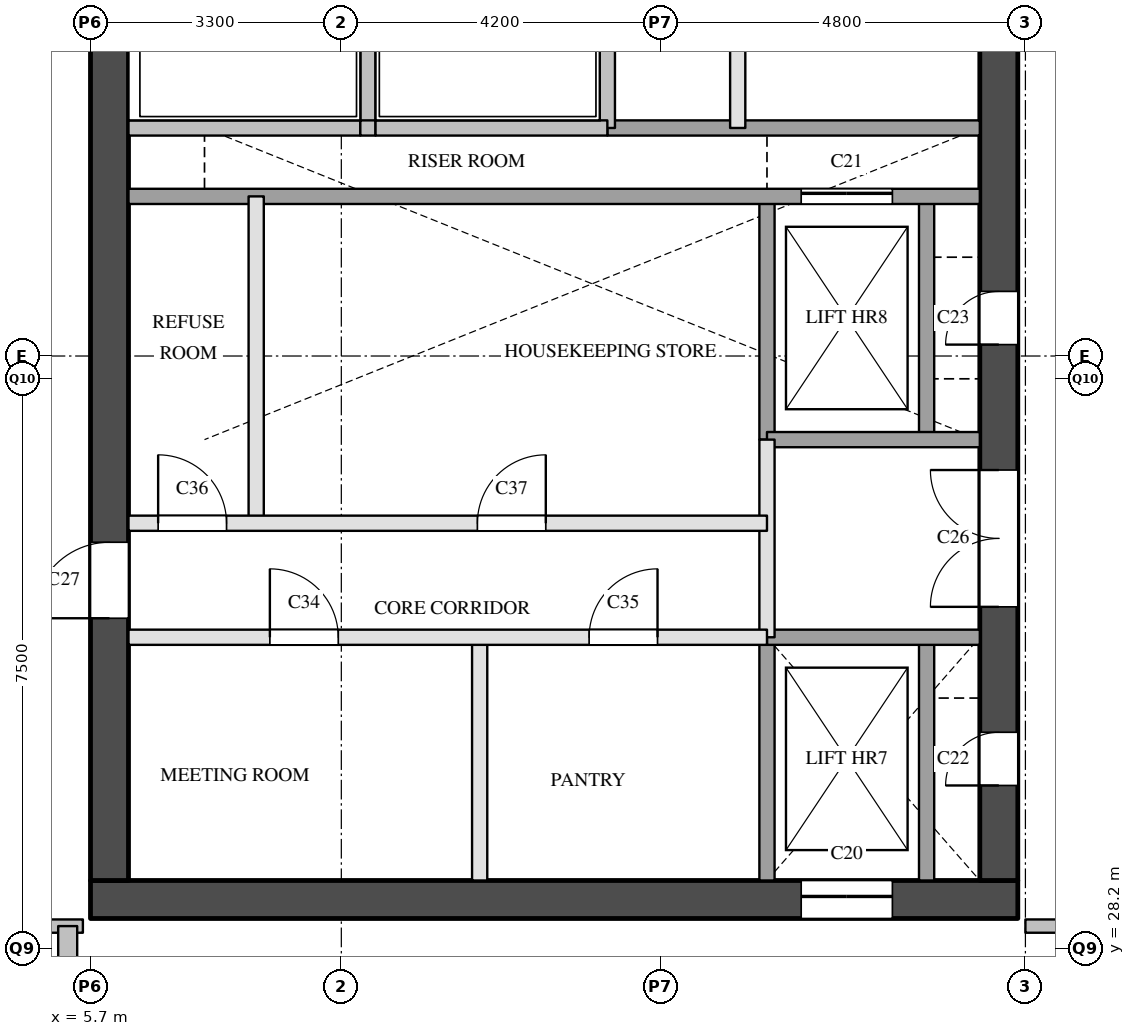
"""IFC4 building model, lengths in metres.
Left out: names, types, materials, properties, quantities, classifications, styles, units other than length and angle.
Written with IfcOpenShell. Run it as: python <this file> out.ifc"""

import sys

from ifc_helpers import new_model, si_unit, direction, frame, frame_2d, origin, place, context, subcontext, project, spatial, rectangle, extrude, element, fill, save


model = new_model("IFC4")
c1 = context("Model", 3, precision=1e-05, world=origin(), true_north=direction((0.0, 1.0)))
c2 = subcontext(c1, "Body", "Model", "MODEL_VIEW")
j1 = project(units=[si_unit("LENGTHUNIT", "METRE"), si_unit("PLANEANGLEUNIT", "RADIAN")], contexts=[c1])
p1 = place(None, origin())
s1 = spatial("IfcSite", under=j1, at=p1, CompositionType="ELEMENT")
p2 = place(p1, origin())
s2 = spatial("IfcBuilding", under=s1, at=p2, CompositionType="ELEMENT")
p3 = place(p2, frame((0.0, 0.0, 189.5)))
s3 = spatial("IfcBuildingStorey", under=s2, at=p3, CompositionType="ELEMENT", Elevation=189.5)
p4 = place(p3, frame((5.7, 28.85, 0.0), z_axis=(0.0, 0.0, 1.0), x_axis=(1.0, 0.0, 0.0)))
e1 = element("IfcWall", 1, at=p4, inside=s3, PredefinedType="SHEAR", context=c2, shape_type="SweptSolid", body=[
    extrude(rectangle(XDim=12.2, YDim=0.5, at=frame_2d((6.1, 0.0))), origin(), (0.0, 0.0, 1.0), 3.6),
])
p5 = place(p4, frame((9.35, 0.0, 0.0)))
e2 = element("IfcOpeningElement", 2, at=p5, cuts=e1, PredefinedType="OPENING", context=c2, shape_type="SweptSolid", body=[
    extrude(rectangle(XDim=1.2, YDim=2.1, at=frame_2d((0.6, 1.05))), frame((0.0, 0.26, 0.0), z_axis=(0.0, -1.0, 0.0), x_axis=(1.0, 0.0, 0.0)), (0.0, 0.0, 1.0), 0.52),
])
p6 = place(p3, frame((5.95, 29.1, 0.0), z_axis=(0.0, 0.0, 1.0), x_axis=(0.0, 1.0, 0.0)))
e3 = element("IfcWall", 3, at=p6, inside=s3, PredefinedType="SHEAR", context=c2, shape_type="SweptSolid", body=[
    extrude(rectangle(XDim=20.3, YDim=0.5, at=frame_2d((10.15, 0.0))), origin(), (0.0, 0.0, 1.0), 3.6),
])
p7 = place(p6, frame((3.45, 0.0, 0.0)))
e4 = element("IfcOpeningElement", 4, at=p7, cuts=e3, PredefinedType="OPENING", context=c2, shape_type="SweptSolid", body=[
    extrude(rectangle(XDim=1.0, YDim=2.1, at=frame_2d((0.5, 1.05))), frame((0.0, 0.26, 0.0), z_axis=(0.0, -1.0, 0.0), x_axis=(1.0, 0.0, 0.0)), (0.0, 0.0, 1.0), 0.52),
])
p8 = place(p6, frame((16.4, 0.0, 0.0)))
e5 = element("IfcOpeningElement", 5, at=p8, cuts=e3, PredefinedType="OPENING", context=c2, shape_type="SweptSolid", body=[
    extrude(rectangle(XDim=1.0, YDim=2.1, at=frame_2d((0.5, 1.05))), frame((0.0, 0.26, 0.0), z_axis=(0.0, -1.0, 0.0), x_axis=(1.0, 0.0, 0.0)), (0.0, 0.0, 1.0), 0.52),
])
p9 = place(p3, frame((17.65, 29.1, 0.0), z_axis=(0.0, 0.0, 1.0), x_axis=(0.0, 1.0, 0.0)))
e6 = element("IfcWall", 6, at=p9, inside=s3, PredefinedType="SHEAR", context=c2, shape_type="SweptSolid", body=[
    extrude(rectangle(XDim=20.3, YDim=0.5, at=frame_2d((10.15, 0.0))), origin(), (0.0, 0.0, 1.0), 3.6),
])
p10 = place(p9, frame((1.25, 0.0, 0.0)))
e7 = element("IfcOpeningElement", 7, at=p10, cuts=e6, PredefinedType="OPENING", context=c2, shape_type="SweptSolid", body=[
    extrude(rectangle(XDim=0.7, YDim=2.1, at=frame_2d((0.35, 1.05))), frame((0.0, 0.26, 0.0), z_axis=(0.0, -1.0, 0.0), x_axis=(1.0, 0.0, 0.0)), (0.0, 0.0, 1.0), 0.52),
])
p11 = place(p9, frame((7.05, 0.0, 0.0)))
e8 = element("IfcOpeningElement", 8, at=p11, cuts=e6, PredefinedType="OPENING", context=c2, shape_type="SweptSolid", body=[
    extrude(rectangle(XDim=0.7, YDim=2.1, at=frame_2d((0.35, 1.05))), frame((0.0, 0.26, 0.0), z_axis=(0.0, -1.0, 0.0), x_axis=(1.0, 0.0, 0.0)), (0.0, 0.0, 1.0), 0.52),
])
p12 = place(p9, frame((3.6, 0.0, 0.0)))
e9 = element("IfcOpeningElement", 9, at=p12, cuts=e6, PredefinedType="OPENING", context=c2, shape_type="SweptSolid", body=[
    extrude(rectangle(XDim=1.8, YDim=2.1, at=frame_2d((0.9, 1.05))), frame((0.0, 0.26, 0.0), z_axis=(0.0, -1.0, 0.0), x_axis=(1.0, 0.0, 0.0)), (0.0, 0.0, 1.0), 0.52),
])
p13 = place(p3, frame((7.88, 33.8, 0.0), z_axis=(0.0, 0.0, 1.0), x_axis=(0.0, 1.0, 0.0)))
e10 = element("IfcWall", 10, at=p13, inside=s3, PredefinedType="PARTITIONING", context=c2, shape_type="SweptSolid", body=[
    extrude(rectangle(XDim=4.3, YDim=0.2, at=frame_2d((2.15, 0.0))), origin(), (0.0, 0.0, 1.0), 3.6),
])
p14 = place(p3, frame((9.35, 39.0, 0.0), z_axis=(0.0, 0.0, 1.0), x_axis=(0.0, 1.0, 0.0)))
e11 = element("IfcWall", 11, at=p14, inside=s3, PredefinedType="SOLIDWALL", context=c2, shape_type="SweptSolid", body=[
    extrude(rectangle(XDim=1.9, YDim=0.2, at=frame_2d((0.95, 0.0))), origin(), (0.0, 0.0, 1.0), 3.6),
])
p15 = place(p3, frame((10.82, 29.1, 0.0), z_axis=(0.0, 0.0, 1.0), x_axis=(0.0, 1.0, 0.0)))
e12 = element("IfcWall", 12, at=p15, inside=s3, PredefinedType="PARTITIONING", context=c2, shape_type="SweptSolid", body=[
    extrude(rectangle(XDim=3.2, YDim=0.2, at=frame_2d((1.6, 0.0))), origin(), (0.0, 0.0, 1.0), 3.6),
])
p16 = place(p3, frame((12.5, 39.0, 0.0), z_axis=(0.0, 0.0, 1.0), x_axis=(0.0, 1.0, 0.0)))
e13 = element("IfcWall", 13, at=p16, inside=s3, PredefinedType="SOLIDWALL", context=c2, shape_type="SweptSolid", body=[
    extrude(rectangle(XDim=1.9, YDim=0.2, at=frame_2d((0.95, 0.0))), origin(), (0.0, 0.0, 1.0), 3.6),
])
p17 = place(p3, frame((14.215, 39.0, 0.0), z_axis=(0.0, 0.0, 1.0), x_axis=(0.0, 1.0, 0.0)))
e14 = element("IfcWall", 14, at=p17, inside=s3, PredefinedType="PARTITIONING", context=c2, shape_type="SweptSolid", body=[
    extrude(rectangle(XDim=6.2, YDim=0.2, at=frame_2d((3.1, 0.0))), origin(), (0.0, 0.0, 1.0), 3.6),
])
p18 = place(p3, frame((14.6, 32.3, 0.0), z_axis=(0.0, 0.0, 1.0), x_axis=(0.0, 1.0, 0.0)))
e15 = element("IfcWall", 15, at=p18, inside=s3, PredefinedType="PARTITIONING", context=c2, shape_type="SweptSolid", body=[
    extrude(rectangle(XDim=2.6, YDim=0.2, at=frame_2d((1.3, 0.0))), origin(), (0.0, 0.0, 1.0), 3.6),
])
p19 = place(p3, frame((14.6, 29.1, 0.0), z_axis=(0.0, 0.0, 1.0), x_axis=(0.0, 1.0, 0.0)))
e16 = element("IfcWall", 16, at=p19, inside=s3, PredefinedType="SOLIDWALL", context=c2, shape_type="SweptSolid", body=[
    extrude(rectangle(XDim=3.2, YDim=0.2, at=frame_2d((1.6, 0.0))), origin(), (0.0, 0.0, 1.0), 3.6),
])
p20 = place(p3, frame((14.6, 34.9, 0.0), z_axis=(0.0, 0.0, 1.0), x_axis=(0.0, 1.0, 0.0)))
e17 = element("IfcWall", 17, at=p20, inside=s3, PredefinedType="SOLIDWALL", context=c2, shape_type="SweptSolid", body=[
    extrude(rectangle(XDim=3.2, YDim=0.2, at=frame_2d((1.6, 0.0))), origin(), (0.0, 0.0, 1.0), 3.6),
])
p21 = place(p3, frame((16.7, 29.1, 0.0), z_axis=(0.0, 0.0, 1.0), x_axis=(0.0, 1.0, 0.0)))
e18 = element("IfcWall", 18, at=p21, inside=s3, PredefinedType="SOLIDWALL", context=c2, shape_type="SweptSolid", body=[
    extrude(rectangle(XDim=3.2, YDim=0.2, at=frame_2d((1.6, 0.0))), origin(), (0.0, 0.0, 1.0), 3.6),
])
p22 = place(p3, frame((16.7, 34.9, 0.0), z_axis=(0.0, 0.0, 1.0), x_axis=(0.0, 1.0, 0.0)))
e19 = element("IfcWall", 19, at=p22, inside=s3, PredefinedType="SOLIDWALL", context=c2, shape_type="SweptSolid", body=[
    extrude(rectangle(XDim=3.2, YDim=0.2, at=frame_2d((1.6, 0.0))), origin(), (0.0, 0.0, 1.0), 3.6),
])
p23 = place(p3, frame((6.2, 32.3, 0.0), z_axis=(0.0, 0.0, 1.0), x_axis=(1.0, 0.0, 0.0)))
e20 = element("IfcWall", 20, at=p23, inside=s3, PredefinedType="PARTITIONING", context=c2, shape_type="SweptSolid", body=[
    extrude(rectangle(XDim=8.4, YDim=0.2, at=frame_2d((4.2, 0.0))), origin(), (0.0, 0.0, 1.0), 3.6),
])
p24 = place(p23, frame((1.86, 0.0, 0.0)))
e21 = element("IfcOpeningElement", 21, at=p24, cuts=e20, PredefinedType="OPENING", context=c2, shape_type="SweptSolid", body=[
    extrude(rectangle(XDim=0.9, YDim=2.1, at=frame_2d((0.45, 1.05))), frame((0.0, 0.11, 0.0), z_axis=(0.0, -1.0, 0.0), x_axis=(1.0, 0.0, 0.0)), (0.0, 0.0, 1.0), 0.22),
])
p25 = place(p23, frame((6.06, 0.0, 0.0)))
e22 = element("IfcOpeningElement", 22, at=p25, cuts=e20, PredefinedType="OPENING", context=c2, shape_type="SweptSolid", body=[
    extrude(rectangle(XDim=0.9, YDim=2.1, at=frame_2d((0.45, 1.05))), frame((0.0, 0.11, 0.0), z_axis=(0.0, -1.0, 0.0), x_axis=(1.0, 0.0, 0.0)), (0.0, 0.0, 1.0), 0.22),
])
p26 = place(p3, frame((14.6, 32.3, 0.0), z_axis=(0.0, 0.0, 1.0), x_axis=(1.0, 0.0, 0.0)))
e23 = element("IfcWall", 23, at=p26, inside=s3, PredefinedType="SOLIDWALL", context=c2, shape_type="SweptSolid", body=[
    extrude(rectangle(XDim=2.8, YDim=0.2, at=frame_2d((1.4, 0.0))), origin(), (0.0, 0.0, 1.0), 3.6),
])
p27 = place(p3, frame((6.2, 33.8, 0.0), z_axis=(0.0, 0.0, 1.0), x_axis=(1.0, 0.0, 0.0)))
e24 = element("IfcWall", 24, at=p27, inside=s3, PredefinedType="PARTITIONING", context=c2, shape_type="SweptSolid", body=[
    extrude(rectangle(XDim=8.4, YDim=0.2, at=frame_2d((4.2, 0.0))), origin(), (0.0, 0.0, 1.0), 3.6),
])
p28 = place(p27, frame((0.39, 0.0, 0.0)))
e25 = element("IfcOpeningElement", 25, at=p28, cuts=e24, PredefinedType="OPENING", context=c2, shape_type="SweptSolid", body=[
    extrude(rectangle(XDim=0.9, YDim=2.1, at=frame_2d((0.45, 1.05))), frame((0.0, 0.11, 0.0), z_axis=(0.0, -1.0, 0.0), x_axis=(1.0, 0.0, 0.0)), (0.0, 0.0, 1.0), 0.22),
])
p29 = place(p27, frame((4.59, 0.0, 0.0)))
e26 = element("IfcOpeningElement", 26, at=p29, cuts=e24, PredefinedType="OPENING", context=c2, shape_type="SweptSolid", body=[
    extrude(rectangle(XDim=0.9, YDim=2.1, at=frame_2d((0.45, 1.05))), frame((0.0, 0.11, 0.0), z_axis=(0.0, -1.0, 0.0), x_axis=(1.0, 0.0, 0.0)), (0.0, 0.0, 1.0), 0.22),
])
p30 = place(p3, frame((14.6, 34.9, 0.0), z_axis=(0.0, 0.0, 1.0), x_axis=(1.0, 0.0, 0.0)))
e27 = element("IfcWall", 27, at=p30, inside=s3, PredefinedType="SOLIDWALL", context=c2, shape_type="SweptSolid", body=[
    extrude(rectangle(XDim=2.8, YDim=0.2, at=frame_2d((1.4, 0.0))), origin(), (0.0, 0.0, 1.0), 3.6),
])
p31 = place(p3, frame((6.2, 38.1, 0.0), z_axis=(0.0, 0.0, 1.0), x_axis=(1.0, 0.0, 0.0)))
e28 = element("IfcWall", 28, at=p31, inside=s3, PredefinedType="SOLIDWALL", context=c2, shape_type="SweptSolid", body=[
    extrude(rectangle(XDim=11.2, YDim=0.2, at=frame_2d((5.6, 0.0))), origin(), (0.0, 0.0, 1.0), 3.6),
])
p32 = place(p31, frame((8.85, 0.0, 0.0)))
e29 = element("IfcOpeningElement", 29, at=p32, cuts=e28, PredefinedType="OPENING", context=c2, shape_type="SweptSolid", body=[
    extrude(rectangle(XDim=1.2, YDim=2.1, at=frame_2d((0.6, 1.05))), frame((0.0, 0.11, 0.0), z_axis=(0.0, -1.0, 0.0), x_axis=(1.0, 0.0, 0.0)), (0.0, 0.0, 1.0), 0.22),
])
p33 = place(p3, frame((12.5, 39.0, 0.0), z_axis=(0.0, 0.0, 1.0), x_axis=(1.0, 0.0, 0.0)))
e30 = element("IfcWall", 30, at=p33, inside=s3, PredefinedType="SOLIDWALL", context=c2, shape_type="SweptSolid", body=[
    extrude(rectangle(XDim=4.9, YDim=0.2, at=frame_2d((2.45, 0.0))), origin(), (0.0, 0.0, 1.0), 3.6),
])
p34 = place(p3, frame((6.2, 39.0, 0.0), z_axis=(0.0, 0.0, 1.0), x_axis=(1.0, 0.0, 0.0)))
e31 = element("IfcWall", 31, at=p34, inside=s3, PredefinedType="SOLIDWALL", context=c2, shape_type="SweptSolid", body=[
    extrude(rectangle(XDim=3.05, YDim=0.2, at=frame_2d((1.525, 0.0))), origin(), (0.0, 0.0, 1.0), 3.6),
])
p35 = place(p3, frame((9.25, 39.0, 0.0), z_axis=(0.0, 0.0, 1.0), x_axis=(1.0, 0.0, 0.0)))
e32 = element("IfcWall", 32, at=p35, inside=s3, PredefinedType="SOLIDWALL", context=c2, shape_type="SweptSolid", body=[
    extrude(rectangle(XDim=0.2, YDim=0.2, at=frame_2d((0.1, 0.0))), origin(), (0.0, 0.0, 1.0), 3.6),
])
p36 = place(p3, frame((9.45, 39.0, 0.0), z_axis=(0.0, 0.0, 1.0), x_axis=(1.0, 0.0, 0.0)))
e33 = element("IfcWall", 33, at=p36, inside=s3, PredefinedType="SOLIDWALL", context=c2, shape_type="SweptSolid", body=[
    extrude(rectangle(XDim=3.05, YDim=0.2, at=frame_2d((1.525, 0.0))), origin(), (0.0, 0.0, 1.0), 3.6),
])
for number, where, z_axis, x_axis in (
    (34, (4.1, 28.5, 0.0), (0.0, 0.0, 1.0), (1.0, 0.0, 0.0)),
    (35, (18.0, 28.5, 0.0), (0.0, 0.0, 1.0), (1.0, 0.0, 0.0)),
):
    element("IfcWall", number, at=place(p3, frame(where, z_axis=z_axis, x_axis=x_axis)), inside=s3, PredefinedType="PARTITIONING", context=c2, shape_type="SweptSolid", body=[
        extrude(rectangle(XDim=1.5, YDim=0.175, at=frame_2d((0.75, 0.0))), origin(), (0.0, 0.0, 1.0), 3.6),
    ])
p37 = place(p3, frame((5.4, 27.0, 0.0), z_axis=(0.0, 0.0, 1.0), x_axis=(0.0, 1.0, 0.0)))
e36 = element("IfcWall", 36, at=p37, inside=s3, PredefinedType="PARTITIONING", context=c2, shape_type="SweptSolid", body=[
    extrude(rectangle(XDim=1.5, YDim=0.25, at=frame_2d((0.75, 0.0))), origin(), (0.0, 0.0, 1.0), 2.6),
])
p38 = place(p5, origin())
e37 = element("IfcDoor", 37, at=p38, inside=s3, OperationType="SLIDING_TO_LEFT", PredefinedType="DOOR", context=c2, shape_type="SweptSolid", body=[
    extrude(rectangle(XDim=1.2, YDim=2.1, at=frame_2d((0.6, 1.05))), frame((0.0, 0.025, 0.0), z_axis=(0.0, -1.0, 0.0), x_axis=(1.0, 0.0, 0.0)), (0.0, 0.0, 1.0), 0.05),
])
fill(e2, e37)
p39 = place(p32, origin())
e38 = element("IfcDoor", 38, at=p39, inside=s3, OperationType="SLIDING_TO_LEFT", PredefinedType="DOOR", context=c2, shape_type="SweptSolid", body=[
    extrude(rectangle(XDim=1.2, YDim=2.1, at=frame_2d((0.6, 1.05))), frame((0.0, 0.025, 0.0), z_axis=(0.0, -1.0, 0.0), x_axis=(1.0, 0.0, 0.0)), (0.0, 0.0, 1.0), 0.05),
])
fill(e29, e38)
p40 = place(p10, origin())
e39 = element("IfcDoor", 39, at=p40, inside=s3, OperationType="SINGLE_SWING_LEFT", PredefinedType="DOOR", context=c2, shape_type="SweptSolid", body=[
    extrude(rectangle(XDim=0.7, YDim=2.1, at=frame_2d((0.35, 1.05))), frame((0.0, 0.025, 0.0), z_axis=(0.0, -1.0, 0.0), x_axis=(1.0, 0.0, 0.0)), (0.0, 0.0, 1.0), 0.05),
])
fill(e7, e39)
p41 = place(p11, origin())
e40 = element("IfcDoor", 40, at=p41, inside=s3, OperationType="SINGLE_SWING_LEFT", PredefinedType="DOOR", context=c2, shape_type="SweptSolid", body=[
    extrude(rectangle(XDim=0.7, YDim=2.1, at=frame_2d((0.35, 1.05))), frame((0.0, 0.025, 0.0), z_axis=(0.0, -1.0, 0.0), x_axis=(1.0, 0.0, 0.0)), (0.0, 0.0, 1.0), 0.05),
])
fill(e8, e40)
p42 = place(p12, origin())
e41 = element("IfcDoor", 41, at=p42, inside=s3, OperationType="DOUBLE_DOOR_SINGLE_SWING", PredefinedType="DOOR", context=c2, shape_type="SweptSolid", body=[
    extrude(rectangle(XDim=1.8, YDim=2.1, at=frame_2d((0.9, 1.05))), frame((0.0, 0.025, 0.0), z_axis=(0.0, -1.0, 0.0), x_axis=(1.0, 0.0, 0.0)), (0.0, 0.0, 1.0), 0.05),
])
fill(e9, e41)
p43 = place(p7, origin())
e42 = element("IfcDoor", 42, at=p43, inside=s3, OperationType="SINGLE_SWING_LEFT", PredefinedType="DOOR", context=c2, shape_type="SweptSolid", body=[
    extrude(rectangle(XDim=1.0, YDim=2.1, at=frame_2d((0.5, 1.05))), frame((0.0, 0.025, 0.0), z_axis=(0.0, -1.0, 0.0), x_axis=(1.0, 0.0, 0.0)), (0.0, 0.0, 1.0), 0.05),
])
fill(e4, e42)
p44 = place(p24, origin())
e43 = element("IfcDoor", 43, at=p44, inside=s3, OperationType="SINGLE_SWING_LEFT", PredefinedType="DOOR", context=c2, shape_type="SweptSolid", body=[
    extrude(rectangle(XDim=0.9, YDim=2.1, at=frame_2d((0.45, 1.05))), frame((0.0, 0.025, 0.0), z_axis=(0.0, -1.0, 0.0), x_axis=(1.0, 0.0, 0.0)), (0.0, 0.0, 1.0), 0.05),
])
fill(e21, e43)
p45 = place(p25, origin())
e44 = element("IfcDoor", 44, at=p45, inside=s3, OperationType="SINGLE_SWING_RIGHT", PredefinedType="DOOR", context=c2, shape_type="SweptSolid", body=[
    extrude(rectangle(XDim=0.9, YDim=2.1, at=frame_2d((0.45, 1.05))), frame((0.0, 0.025, 0.0), z_axis=(0.0, -1.0, 0.0), x_axis=(1.0, 0.0, 0.0)), (0.0, 0.0, 1.0), 0.05),
])
fill(e22, e44)
p46 = place(p28, origin())
e45 = element("IfcDoor", 45, at=p46, inside=s3, OperationType="SINGLE_SWING_LEFT", PredefinedType="DOOR", context=c2, shape_type="SweptSolid", body=[
    extrude(rectangle(XDim=0.9, YDim=2.1, at=frame_2d((0.45, 1.05))), frame((0.0, 0.025, 0.0), z_axis=(0.0, -1.0, 0.0), x_axis=(1.0, 0.0, 0.0)), (0.0, 0.0, 1.0), 0.05),
])
fill(e25, e45)
p47 = place(p29, origin())
e46 = element("IfcDoor", 46, at=p47, inside=s3, OperationType="SINGLE_SWING_RIGHT", PredefinedType="DOOR", context=c2, shape_type="SweptSolid", body=[
    extrude(rectangle(XDim=0.9, YDim=2.1, at=frame_2d((0.45, 1.05))), frame((0.0, 0.025, 0.0), z_axis=(0.0, -1.0, 0.0), x_axis=(1.0, 0.0, 0.0)), (0.0, 0.0, 1.0), 0.05),
])
fill(e26, e46)
save(model, sys.argv[1])
